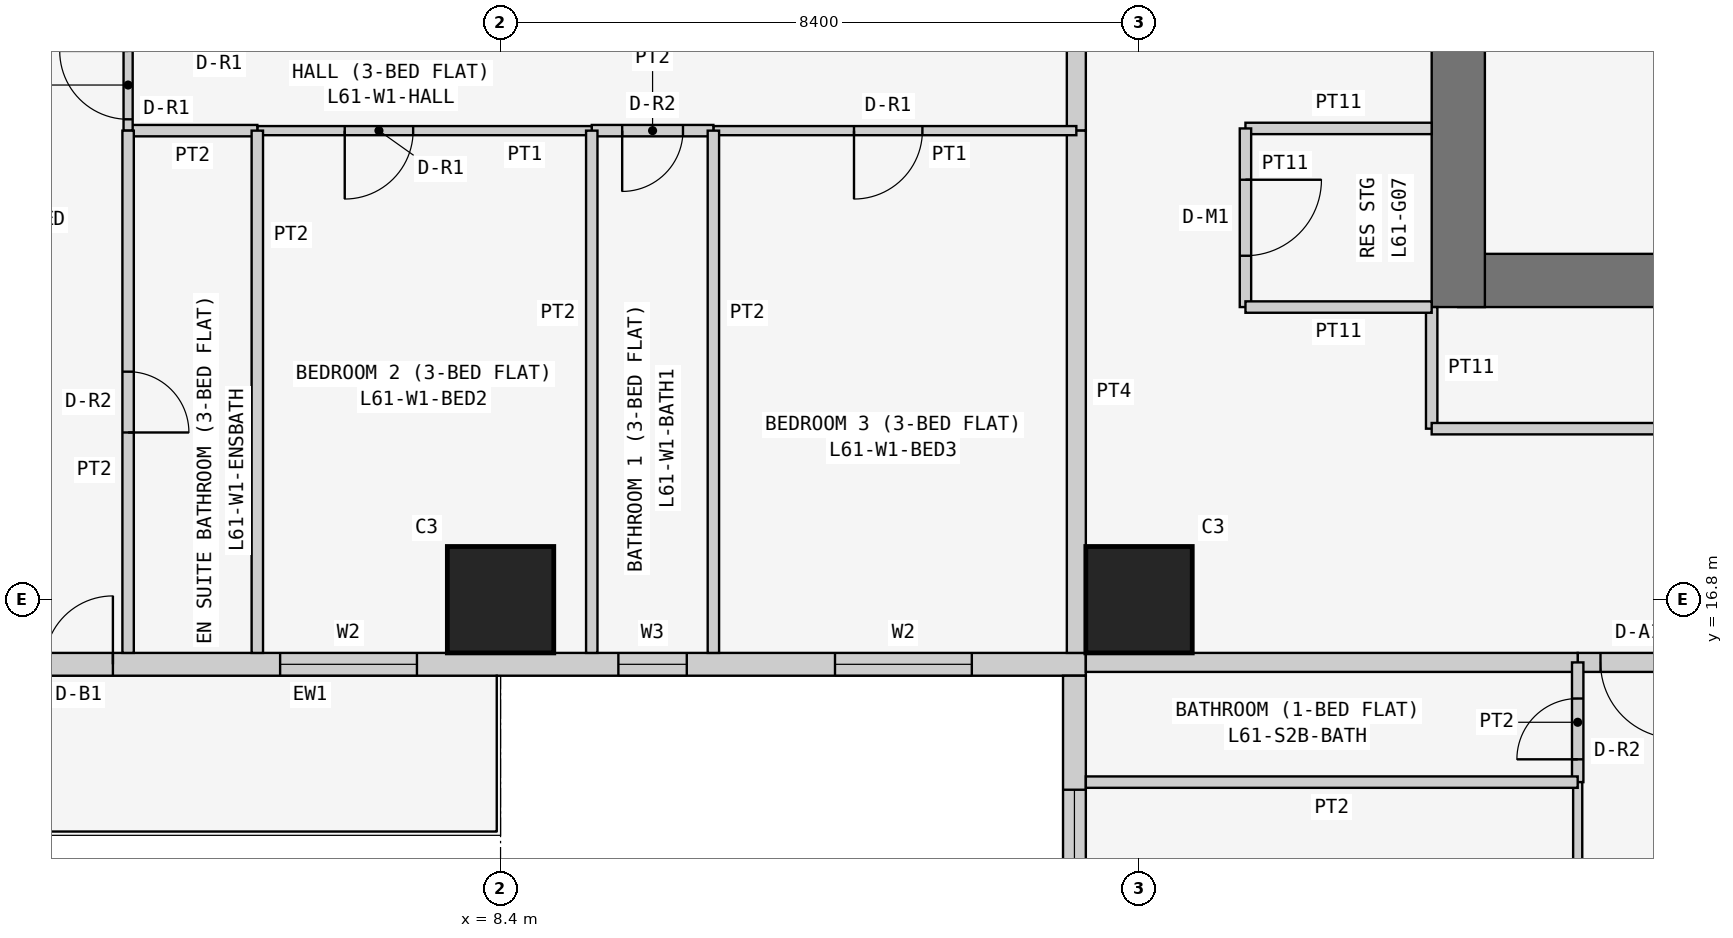
"""IFC4 building model, lengths in metres.
Left out: names, types, materials, properties, quantities, classifications, styles, units other than length and angle.
Written with IfcOpenShell. Run it as: python <this file> out.ifc"""

import sys

from ifc_helpers import new_model, si_unit, direction, frame, frame_2d, origin, origin_2d, place, context, subcontext, project, spatial, rectangle, extrude, element, fill, save


model = new_model("IFC4")
c1 = context("Model", 3, precision=1e-05, world=origin(), true_north=direction((0.0, 1.0)))
c2 = subcontext(c1, "Body", "Model", "MODEL_VIEW")
j1 = project(units=[si_unit("LENGTHUNIT", "METRE"), si_unit("PLANEANGLEUNIT", "RADIAN")], contexts=[c1])
p1 = place(None, origin())
s1 = spatial("IfcSite", under=j1, at=p1, CompositionType="ELEMENT")
p2 = place(p1, origin())
s2 = spatial("IfcBuilding", under=s1, at=p2, CompositionType="ELEMENT")
p3 = place(p2, frame((0.0, 0.0, 233.7)))
s3 = spatial("IfcBuildingStorey", under=s2, at=p3, CompositionType="ELEMENT", Elevation=233.7)
for number, where, z_axis, x_axis in (
    (1, (8.4, 16.8, 0.0), (0.0, 0.0, 1.0), (1.0, 0.0, 0.0)),
    (2, (16.8, 16.8, 0.0), (0.0, 0.0, 1.0), (1.0, 0.0, 0.0)),
):
    element("IfcColumn", number, at=place(p3, frame(where, z_axis=z_axis, x_axis=x_axis)), inside=s3, PredefinedType="COLUMN", context=c2, shape_type="SweptSolid", body=[
        extrude(rectangle(XDim=1.4, YDim=1.4, at=origin_2d()), origin(), (0.0, 0.0, 1.0), 3.6),
    ])
p4 = place(p3, frame((21.0, 21.0, 0.0), z_axis=(0.0, 0.0, 1.0), x_axis=(1.0, 0.0, 0.0)))
e3 = element("IfcWall", 3, at=p4, inside=s3, PredefinedType="SHEAR", context=c2, shape_type="SweptSolid", body=[
    extrude(rectangle(XDim=17.15, YDim=0.7, at=frame_2d((8.575, 0.0))), origin(), (0.0, 0.0, 1.0), 3.6),
])
p5 = place(p3, frame((21.0, 37.8, 0.0), z_axis=(0.0, 0.0, 1.0), x_axis=(0.0, -1.0, 0.0)))
e4 = element("IfcWall", 4, at=p5, inside=s3, PredefinedType="SHEAR", context=c2, shape_type="SweptSolid", body=[
    extrude(rectangle(XDim=17.15, YDim=0.7, at=frame_2d((8.575, 0.0))), origin(), (0.0, 0.0, 1.0), 3.6),
])
p6 = place(p5, frame((5.4, 0.0, 0.0)))
e5 = element("IfcOpeningElement", 5, at=p6, cuts=e4, PredefinedType="OPENING", context=c2, shape_type="SweptSolid", body=[
    extrude(rectangle(XDim=1.2, YDim=2.1, at=frame_2d((0.6, 1.05))), frame((0.0, 0.36, 0.0), z_axis=(0.0, -1.0, 0.0), x_axis=(1.0, 0.0, 0.0)), (0.0, 0.0, 1.0), 0.72),
])
p7 = place(p3, frame((0.4, 15.95, 0.0), z_axis=(0.0, 0.0, 1.0), x_axis=(1.0, 0.0, 0.0)))
e6 = element("IfcWall", 6, at=p7, inside=s3, PredefinedType="SOLIDWALL", context=c2, shape_type="SweptSolid", body=[
    extrude(rectangle(XDim=15.7, YDim=0.3, at=frame_2d((7.85, 0.0))), origin(), (0.0, 0.0, 1.0), 3.45),
])
p8 = place(p7, frame((12.4, 0.0, 0.9)))
e7 = element("IfcOpeningElement", 7, at=p8, cuts=e6, PredefinedType="OPENING", context=c2, shape_type="SweptSolid", body=[
    extrude(rectangle(XDim=1.8, YDim=1.5, at=frame_2d((0.9, 0.75))), frame((0.0, 0.16, 0.0), z_axis=(0.0, -1.0, 0.0), x_axis=(1.0, 0.0, 0.0)), (0.0, 0.0, 1.0), 0.32),
])
p9 = place(p7, frame((9.55, 0.0, 1.5)))
e8 = element("IfcOpeningElement", 8, at=p9, cuts=e6, PredefinedType="OPENING", context=c2, shape_type="SweptSolid", body=[
    extrude(rectangle(XDim=0.9, YDim=0.7, at=frame_2d((0.45, 0.35))), frame((0.0, 0.16, 0.0), z_axis=(0.0, -1.0, 0.0), x_axis=(1.0, 0.0, 0.0)), (0.0, 0.0, 1.0), 0.32),
])
p10 = place(p7, frame((5.1, 0.0, 0.9)))
e9 = element("IfcOpeningElement", 9, at=p10, cuts=e6, PredefinedType="OPENING", context=c2, shape_type="SweptSolid", body=[
    extrude(rectangle(XDim=1.8, YDim=1.5, at=frame_2d((0.9, 0.75))), frame((0.0, 0.16, 0.0), z_axis=(0.0, -1.0, 0.0), x_axis=(1.0, 0.0, 0.0)), (0.0, 0.0, 1.0), 0.32),
])
p11 = place(p7, frame((2.0, 0.0, 0.0)))
e10 = element("IfcOpeningElement", 10, at=p11, cuts=e6, PredefinedType="OPENING", context=c2, shape_type="SweptSolid", body=[
    extrude(rectangle(XDim=0.9, YDim=2.4, at=frame_2d((0.45, 1.2))), frame((0.0, 0.16, 0.0), z_axis=(0.0, -1.0, 0.0), x_axis=(1.0, 0.0, 0.0)), (0.0, 0.0, 1.0), 0.32),
])
p12 = place(p7, frame((0.7, 0.0, 0.9)))
e11 = element("IfcOpeningElement", 11, at=p12, cuts=e6, PredefinedType="OPENING", context=c2, shape_type="SweptSolid", body=[
    extrude(rectangle(XDim=1.2, YDim=1.5, at=frame_2d((0.6, 0.75))), frame((0.0, 0.16, 0.0), z_axis=(0.0, -1.0, 0.0), x_axis=(1.0, 0.0, 0.0)), (0.0, 0.0, 1.0), 0.32),
])
p13 = place(p3, frame((15.95, 15.8, 0.0), z_axis=(0.0, 0.0, 1.0), x_axis=(0.0, -1.0, 0.0)))
e12 = element("IfcWall", 12, at=p13, inside=s3, PredefinedType="SOLIDWALL", context=c2, shape_type="SweptSolid", body=[
    extrude(rectangle(XDim=7.0, YDim=0.3, at=frame_2d((3.5, 0.0))), origin(), (0.0, 0.0, 1.0), 3.45),
])
p14 = place(p13, frame((1.5, 0.0, 0.9)))
e13 = element("IfcOpeningElement", 13, at=p14, cuts=e12, PredefinedType="OPENING", context=c2, shape_type="SweptSolid", body=[
    extrude(rectangle(XDim=2.4, YDim=1.5, at=frame_2d((1.2, 0.75))), frame((0.0, 0.16, 0.0), z_axis=(0.0, -1.0, 0.0), x_axis=(1.0, 0.0, 0.0)), (0.0, 0.0, 1.0), 0.32),
])
p15 = place(p13, frame((5.05, 0.0, 0.9)))
e14 = element("IfcOpeningElement", 14, at=p15, cuts=e12, PredefinedType="OPENING", context=c2, shape_type="SweptSolid", body=[
    extrude(rectangle(XDim=1.2, YDim=1.5, at=frame_2d((0.6, 0.75))), frame((0.0, 0.16, 0.0), z_axis=(0.0, -1.0, 0.0), x_axis=(1.0, 0.0, 0.0)), (0.0, 0.0, 1.0), 0.32),
])
p16 = place(p3, frame((20.65, 20.65, 0.0), z_axis=(0.0, 0.0, 1.0), x_axis=(0.0, -1.0, 0.0)))
e15 = element("IfcWall", 15, at=p16, inside=s3, PredefinedType="PARTITIONING", context=c2, shape_type="SweptSolid", body=[
    extrude(rectangle(XDim=1.6, YDim=0.15, at=frame_2d((0.8, 0.0))), origin(), (0.0, 0.0, 1.0), 3.45),
])
p17 = place(p3, frame((20.65, 19.05, 0.0), z_axis=(0.0, 0.0, 1.0), x_axis=(1.0, 0.0, 0.0)))
e16 = element("IfcWall", 16, at=p17, inside=s3, PredefinedType="PARTITIONING", context=c2, shape_type="SweptSolid", body=[
    extrude(rectangle(XDim=11.95, YDim=0.15, at=frame_2d((5.975, 0.0))), origin(), (0.0, 0.0, 1.0), 3.45),
])
p18 = place(p17, frame((8.25, 0.0, 0.0)))
e17 = element("IfcOpeningElement", 17, at=p18, cuts=e16, PredefinedType="OPENING", context=c2, shape_type="SweptSolid", body=[
    extrude(rectangle(XDim=1.0, YDim=2.1, at=frame_2d((0.5, 1.05))), frame((0.0, 0.085, 0.0), z_axis=(0.0, -1.0, 0.0), x_axis=(1.0, 0.0, 0.0)), (0.0, 0.0, 1.0), 0.17),
])
p19 = place(p3, frame((20.65, 23.0, 0.0), z_axis=(0.0, 0.0, 1.0), x_axis=(-1.0, 0.0, 0.0)))
e18 = element("IfcWall", 18, at=p19, inside=s3, PredefinedType="PARTITIONING", context=c2, shape_type="SweptSolid", body=[
    extrude(rectangle(XDim=2.45, YDim=0.15, at=frame_2d((1.225, 0.0))), origin(), (0.0, 0.0, 1.0), 3.45),
])
p20 = place(p3, frame((18.2, 23.0, 0.0), z_axis=(0.0, 0.0, 1.0), x_axis=(0.0, -1.0, 0.0)))
e19 = element("IfcWall", 19, at=p20, inside=s3, PredefinedType="PARTITIONING", context=c2, shape_type="SweptSolid", body=[
    extrude(rectangle(XDim=2.35, YDim=0.15, at=frame_2d((1.175, 0.0))), origin(), (0.0, 0.0, 1.0), 3.45),
])
p21 = place(p20, frame((0.675, 0.0, 0.0)))
e20 = element("IfcOpeningElement", 20, at=p21, cuts=e19, PredefinedType="OPENING", context=c2, shape_type="SweptSolid", body=[
    extrude(rectangle(XDim=1.0, YDim=2.1, at=frame_2d((0.5, 1.05))), frame((0.0, 0.085, 0.0), z_axis=(0.0, -1.0, 0.0), x_axis=(1.0, 0.0, 0.0)), (0.0, 0.0, 1.0), 0.17),
])
p22 = place(p3, frame((18.2, 20.65, 0.0), z_axis=(0.0, 0.0, 1.0), x_axis=(1.0, 0.0, 0.0)))
e21 = element("IfcWall", 21, at=p22, inside=s3, PredefinedType="PARTITIONING", context=c2, shape_type="SweptSolid", body=[
    extrude(rectangle(XDim=2.45, YDim=0.15, at=frame_2d((1.225, 0.0))), origin(), (0.0, 0.0, 1.0), 3.45),
])
p23 = place(p3, frame((24.171, 15.975, 0.0), z_axis=(0.0, 0.0, 1.0), x_axis=(-1.0, 0.0, 0.0)))
e22 = element("IfcWall", 22, at=p23, inside=s3, PredefinedType="PARTITIONING", context=c2, shape_type="SweptSolid", body=[
    extrude(rectangle(XDim=1.6, YDim=0.25, at=frame_2d((0.8, 0.0))), origin(), (0.0, 0.0, 1.0), 3.45),
])
p24 = place(p23, frame((0.3, 0.0, 0.0)))
e23 = element("IfcOpeningElement", 23, at=p24, cuts=e22, PredefinedType="OPENING", context=c2, shape_type="SweptSolid", body=[
    extrude(rectangle(XDim=1.0, YDim=2.1, at=frame_2d((0.5, 1.05))), frame((0.0, 0.135, 0.0), z_axis=(0.0, -1.0, 0.0), x_axis=(1.0, 0.0, 0.0)), (0.0, 0.0, 1.0), 0.27),
])
p25 = place(p3, frame((22.571, 15.975, 0.0), z_axis=(0.0, 0.0, 1.0), x_axis=(-1.0, 0.0, 0.0)))
e24 = element("IfcWall", 24, at=p25, inside=s3, PredefinedType="PARTITIONING", context=c2, shape_type="SweptSolid", body=[
    extrude(rectangle(XDim=6.471, YDim=0.25, at=frame_2d((3.235, 0.0))), origin(), (0.0, 0.0, 1.0), 3.45),
])
p26 = place(p3, frame((15.975, 22.971, 0.0), z_axis=(0.0, 0.0, 1.0), x_axis=(0.0, 1.0, 0.0)))
e25 = element("IfcWall", 25, at=p26, inside=s3, PredefinedType="PARTITIONING", context=c2, shape_type="SweptSolid", body=[
    extrude(rectangle(XDim=1.2, YDim=0.25, at=frame_2d((0.6, 0.0))), origin(), (0.0, 0.0, 1.0), 3.45),
])
p27 = place(p3, frame((15.975, 16.1, 0.0), z_axis=(0.0, 0.0, 1.0), x_axis=(0.0, 1.0, 0.0)))
e26 = element("IfcWall", 26, at=p27, inside=s3, PredefinedType="PARTITIONING", context=c2, shape_type="SweptSolid", body=[
    extrude(rectangle(XDim=6.871, YDim=0.25, at=frame_2d((3.436, 0.0))), origin(), (0.0, 0.0, 1.0), 3.45),
])
p28 = place(p3, frame((22.571, 14.4, 0.0), z_axis=(0.0, 0.0, 1.0), x_axis=(0.0, 1.0, 0.0)))
e27 = element("IfcWall", 27, at=p28, inside=s3, PredefinedType="PARTITIONING", context=c2, shape_type="SweptSolid", body=[
    extrude(rectangle(XDim=1.575, YDim=0.15, at=frame_2d((0.788, 0.0))), origin(), (0.0, 0.0, 1.0), 3.45),
])
p29 = place(p28, frame((0.3, 0.0, 0.0)))
e28 = element("IfcOpeningElement", 28, at=p29, cuts=e27, PredefinedType="OPENING", context=c2, shape_type="SweptSolid", body=[
    extrude(rectangle(XDim=0.8, YDim=2.1, at=frame_2d((0.4, 1.05))), frame((0.0, 0.085, 0.0), z_axis=(0.0, -1.0, 0.0), x_axis=(1.0, 0.0, 0.0)), (0.0, 0.0, 1.0), 0.17),
])
p30 = place(p3, frame((22.571, 11.0, 0.0), z_axis=(0.0, 0.0, 1.0), x_axis=(0.0, 1.0, 0.0)))
e29 = element("IfcWall", 29, at=p30, inside=s3, PredefinedType="PARTITIONING", context=c2, shape_type="SweptSolid", body=[
    extrude(rectangle(XDim=3.4, YDim=0.12, at=frame_2d((1.7, 0.0))), origin(), (0.0, 0.0, 1.0), 3.45),
])
p31 = place(p30, frame((1.25, 0.0, 0.0)))
e30 = element("IfcOpeningElement", 30, at=p31, cuts=e29, PredefinedType="OPENING", context=c2, shape_type="SweptSolid", body=[
    extrude(rectangle(XDim=0.9, YDim=2.1, at=frame_2d((0.45, 1.05))), frame((0.0, 0.07, 0.0), z_axis=(0.0, -1.0, 0.0), x_axis=(1.0, 0.0, 0.0)), (0.0, 0.0, 1.0), 0.14),
])
p32 = place(p3, frame((22.571, 14.4, 0.0), z_axis=(0.0, 0.0, 1.0), x_axis=(-1.0, 0.0, 0.0)))
e31 = element("IfcWall", 31, at=p32, inside=s3, PredefinedType="PARTITIONING", context=c2, shape_type="SweptSolid", body=[
    extrude(rectangle(XDim=6.471, YDim=0.15, at=frame_2d((3.235, 0.0))), origin(), (0.0, 0.0, 1.0), 3.45),
])
p33 = place(p3, frame((11.2, 22.971, 0.0), z_axis=(0.0, 0.0, 1.0), x_axis=(1.0, 0.0, 0.0)))
e32 = element("IfcWall", 32, at=p33, inside=s3, PredefinedType="PARTITIONING", context=c2, shape_type="SweptSolid", body=[
    extrude(rectangle(XDim=4.775, YDim=0.12, at=frame_2d((2.388, 0.0))), origin(), (0.0, 0.0, 1.0), 3.45),
])
p34 = place(p33, frame((1.85, 0.0, 0.0)))
e33 = element("IfcOpeningElement", 33, at=p34, cuts=e32, PredefinedType="OPENING", context=c2, shape_type="SweptSolid", body=[
    extrude(rectangle(XDim=0.9, YDim=2.1, at=frame_2d((0.45, 1.05))), frame((0.0, 0.07, 0.0), z_axis=(0.0, -1.0, 0.0), x_axis=(1.0, 0.0, 0.0)), (0.0, 0.0, 1.0), 0.14),
])
p35 = place(p3, frame((9.6, 22.971, 0.0), z_axis=(0.0, 0.0, 1.0), x_axis=(1.0, 0.0, 0.0)))
e34 = element("IfcWall", 34, at=p35, inside=s3, PredefinedType="PARTITIONING", context=c2, shape_type="SweptSolid", body=[
    extrude(rectangle(XDim=1.6, YDim=0.15, at=frame_2d((0.8, 0.0))), origin(), (0.0, 0.0, 1.0), 3.45),
])
p36 = place(p35, frame((0.4, 0.0, 0.0)))
e35 = element("IfcOpeningElement", 35, at=p36, cuts=e34, PredefinedType="OPENING", context=c2, shape_type="SweptSolid", body=[
    extrude(rectangle(XDim=0.8, YDim=2.1, at=frame_2d((0.4, 1.05))), frame((0.0, 0.085, 0.0), z_axis=(0.0, -1.0, 0.0), x_axis=(1.0, 0.0, 0.0)), (0.0, 0.0, 1.0), 0.17),
])
p37 = place(p3, frame((5.2, 22.971, 0.0), z_axis=(0.0, 0.0, 1.0), x_axis=(1.0, 0.0, 0.0)))
e36 = element("IfcWall", 36, at=p37, inside=s3, PredefinedType="PARTITIONING", context=c2, shape_type="SweptSolid", body=[
    extrude(rectangle(XDim=4.4, YDim=0.12, at=frame_2d((2.2, 0.0))), origin(), (0.0, 0.0, 1.0), 3.45),
])
p38 = place(p37, frame((1.15, 0.0, 0.0)))
e37 = element("IfcOpeningElement", 37, at=p38, cuts=e36, PredefinedType="OPENING", context=c2, shape_type="SweptSolid", body=[
    extrude(rectangle(XDim=0.9, YDim=2.1, at=frame_2d((0.45, 1.05))), frame((0.0, 0.07, 0.0), z_axis=(0.0, -1.0, 0.0), x_axis=(1.0, 0.0, 0.0)), (0.0, 0.0, 1.0), 0.14),
])
p39 = place(p3, frame((3.5, 22.971, 0.0), z_axis=(0.0, 0.0, 1.0), x_axis=(1.0, 0.0, 0.0)))
e38 = element("IfcWall", 38, at=p39, inside=s3, PredefinedType="PARTITIONING", context=c2, shape_type="SweptSolid", body=[
    extrude(rectangle(XDim=1.7, YDim=0.15, at=frame_2d((0.85, 0.0))), origin(), (0.0, 0.0, 1.0), 3.45),
])
p40 = place(p3, frame((3.5, 24.171, 0.0), z_axis=(0.0, 0.0, 1.0), x_axis=(0.0, -1.0, 0.0)))
e39 = element("IfcWall", 39, at=p40, inside=s3, PredefinedType="PARTITIONING", context=c2, shape_type="SweptSolid", body=[
    extrude(rectangle(XDim=1.2, YDim=0.12, at=frame_2d((0.6, 0.0))), origin(), (0.0, 0.0, 1.0), 3.45),
])
p41 = place(p40, frame((0.151, 0.0, 0.0)))
e40 = element("IfcOpeningElement", 40, at=p41, cuts=e39, PredefinedType="OPENING", context=c2, shape_type="SweptSolid", body=[
    extrude(rectangle(XDim=0.9, YDim=2.1, at=frame_2d((0.45, 1.05))), frame((0.0, 0.07, 0.0), z_axis=(0.0, -1.0, 0.0), x_axis=(1.0, 0.0, 0.0)), (0.0, 0.0, 1.0), 0.14),
])
for number, where, z_axis, x_axis in (
    (41, (11.2, 22.971, 0.0), (0.0, 0.0, 1.0), (0.0, -1.0, 0.0)),
    (42, (9.6, 22.971, 0.0), (0.0, 0.0, 1.0), (0.0, -1.0, 0.0)),
    (43, (5.2, 22.971, 0.0), (0.0, 0.0, 1.0), (0.0, -1.0, 0.0)),
):
    element("IfcWall", number, at=place(p3, frame(where, z_axis=z_axis, x_axis=x_axis)), inside=s3, PredefinedType="PARTITIONING", context=c2, shape_type="SweptSolid", body=[
        extrude(rectangle(XDim=6.871, YDim=0.15, at=frame_2d((3.436, 0.0))), origin(), (0.0, 0.0, 1.0), 3.45),
    ])
p42 = place(p3, frame((3.5, 22.971, 0.0), z_axis=(0.0, 0.0, 1.0), x_axis=(0.0, -1.0, 0.0)))
e44 = element("IfcWall", 44, at=p42, inside=s3, PredefinedType="PARTITIONING", context=c2, shape_type="SweptSolid", body=[
    extrude(rectangle(XDim=6.871, YDim=0.15, at=frame_2d((3.436, 0.0))), origin(), (0.0, 0.0, 1.0), 3.45),
])
p43 = place(p42, frame((3.171, 0.0, 0.0)))
e45 = element("IfcOpeningElement", 45, at=p43, cuts=e44, PredefinedType="OPENING", context=c2, shape_type="SweptSolid", body=[
    extrude(rectangle(XDim=0.8, YDim=2.1, at=frame_2d((0.4, 1.05))), frame((0.0, 0.085, 0.0), z_axis=(0.0, -1.0, 0.0), x_axis=(1.0, 0.0, 0.0)), (0.0, 0.0, 1.0), 0.17),
])
p44 = place(p14, origin())
e46 = element("IfcWindow", 46, at=p44, inside=s3, PartitioningType="SINGLE_PANEL", PredefinedType="WINDOW", context=c2, shape_type="SweptSolid", body=[
    extrude(rectangle(XDim=2.4, YDim=1.5, at=frame_2d((1.2, 0.75))), frame((0.0, 0.03, 0.0), z_axis=(0.0, -1.0, 0.0), x_axis=(1.0, 0.0, 0.0)), (0.0, 0.0, 1.0), 0.06),
])
fill(e13, e46)
p45 = place(p8, origin())
e47 = element("IfcWindow", 47, at=p45, inside=s3, PartitioningType="SINGLE_PANEL", PredefinedType="WINDOW", context=c2, shape_type="SweptSolid", body=[
    extrude(rectangle(XDim=1.8, YDim=1.5, at=frame_2d((0.9, 0.75))), frame((0.0, 0.03, 0.0), z_axis=(0.0, -1.0, 0.0), x_axis=(1.0, 0.0, 0.0)), (0.0, 0.0, 1.0), 0.06),
])
fill(e7, e47)
p46 = place(p9, origin())
e48 = element("IfcWindow", 48, at=p46, inside=s3, PartitioningType="SINGLE_PANEL", PredefinedType="WINDOW", context=c2, shape_type="SweptSolid", body=[
    extrude(rectangle(XDim=0.9, YDim=0.7, at=frame_2d((0.45, 0.35))), frame((0.0, 0.03, 0.0), z_axis=(0.0, -1.0, 0.0), x_axis=(1.0, 0.0, 0.0)), (0.0, 0.0, 1.0), 0.06),
])
fill(e8, e48)
p47 = place(p10, origin())
e49 = element("IfcWindow", 49, at=p47, inside=s3, PartitioningType="SINGLE_PANEL", PredefinedType="WINDOW", context=c2, shape_type="SweptSolid", body=[
    extrude(rectangle(XDim=1.8, YDim=1.5, at=frame_2d((0.9, 0.75))), frame((0.0, 0.03, 0.0), z_axis=(0.0, -1.0, 0.0), x_axis=(1.0, 0.0, 0.0)), (0.0, 0.0, 1.0), 0.06),
])
fill(e9, e49)
p48 = place(p11, origin())
e50 = element("IfcDoor", 50, at=p48, inside=s3, OperationType="SINGLE_SWING_RIGHT", PredefinedType="DOOR", context=c2, shape_type="SweptSolid", body=[
    extrude(rectangle(XDim=0.9, YDim=2.4, at=frame_2d((0.45, 1.2))), frame((0.0, 0.025, 0.0), z_axis=(0.0, -1.0, 0.0), x_axis=(1.0, 0.0, 0.0)), (0.0, 0.0, 1.0), 0.05),
])
fill(e10, e50)
p49 = place(p21, origin())
e51 = element("IfcDoor", 51, at=p49, inside=s3, OperationType="SINGLE_SWING_LEFT", PredefinedType="DOOR", context=c2, shape_type="SweptSolid", body=[
    extrude(rectangle(XDim=1.0, YDim=2.1, at=frame_2d((0.5, 1.05))), frame((0.0, 0.025, 0.0), z_axis=(0.0, -1.0, 0.0), x_axis=(1.0, 0.0, 0.0)), (0.0, 0.0, 1.0), 0.05),
])
fill(e20, e51)
p50 = place(p24, origin())
e52 = element("IfcDoor", 52, at=p50, inside=s3, OperationType="SINGLE_SWING_LEFT", PredefinedType="DOOR", context=c2, shape_type="SweptSolid", body=[
    extrude(rectangle(XDim=1.0, YDim=2.1, at=frame_2d((0.5, 1.05))), frame((0.0, 0.025, 0.0), z_axis=(0.0, -1.0, 0.0), x_axis=(1.0, 0.0, 0.0)), (0.0, 0.0, 1.0), 0.05),
])
fill(e23, e52)
p51 = place(p29, origin())
e53 = element("IfcDoor", 53, at=p51, inside=s3, OperationType="SINGLE_SWING_LEFT", PredefinedType="DOOR", context=c2, shape_type="SweptSolid", body=[
    extrude(rectangle(XDim=0.8, YDim=2.1, at=frame_2d((0.4, 1.05))), frame((0.0, 0.025, 0.0), z_axis=(0.0, -1.0, 0.0), x_axis=(1.0, 0.0, 0.0)), (0.0, 0.0, 1.0), 0.05),
])
fill(e28, e53)
p52 = place(p34, frame((0.9, 0.0, 0.0), z_axis=(0.0, 0.0, 1.0), x_axis=(-1.0, 0.0, 0.0)))
e54 = element("IfcDoor", 54, at=p52, inside=s3, OperationType="SINGLE_SWING_RIGHT", PredefinedType="DOOR", context=c2, shape_type="SweptSolid", body=[
    extrude(rectangle(XDim=0.9, YDim=2.1, at=frame_2d((0.45, 1.05))), frame((0.0, 0.025, 0.0), z_axis=(0.0, -1.0, 0.0), x_axis=(1.0, 0.0, 0.0)), (0.0, 0.0, 1.0), 0.05),
])
fill(e33, e54)
p53 = place(p36, frame((0.8, 0.0, 0.0), z_axis=(0.0, 0.0, 1.0), x_axis=(-1.0, 0.0, 0.0)))
e55 = element("IfcDoor", 55, at=p53, inside=s3, OperationType="SINGLE_SWING_RIGHT", PredefinedType="DOOR", context=c2, shape_type="SweptSolid", body=[
    extrude(rectangle(XDim=0.8, YDim=2.1, at=frame_2d((0.4, 1.05))), frame((0.0, 0.025, 0.0), z_axis=(0.0, -1.0, 0.0), x_axis=(1.0, 0.0, 0.0)), (0.0, 0.0, 1.0), 0.05),
])
fill(e35, e55)
p54 = place(p38, frame((0.9, 0.0, 0.0), z_axis=(0.0, 0.0, 1.0), x_axis=(-1.0, 0.0, 0.0)))
e56 = element("IfcDoor", 56, at=p54, inside=s3, OperationType="SINGLE_SWING_RIGHT", PredefinedType="DOOR", context=c2, shape_type="SweptSolid", body=[
    extrude(rectangle(XDim=0.9, YDim=2.1, at=frame_2d((0.45, 1.05))), frame((0.0, 0.025, 0.0), z_axis=(0.0, -1.0, 0.0), x_axis=(1.0, 0.0, 0.0)), (0.0, 0.0, 1.0), 0.05),
])
fill(e37, e56)
p55 = place(p41, frame((0.9, 0.0, 0.0), z_axis=(0.0, 0.0, 1.0), x_axis=(-1.0, 0.0, 0.0)))
e57 = element("IfcDoor", 57, at=p55, inside=s3, OperationType="SINGLE_SWING_RIGHT", PredefinedType="DOOR", context=c2, shape_type="SweptSolid", body=[
    extrude(rectangle(XDim=0.9, YDim=2.1, at=frame_2d((0.45, 1.05))), frame((0.0, 0.025, 0.0), z_axis=(0.0, -1.0, 0.0), x_axis=(1.0, 0.0, 0.0)), (0.0, 0.0, 1.0), 0.05),
])
fill(e40, e57)
p56 = place(p43, origin())
e58 = element("IfcDoor", 58, at=p56, inside=s3, OperationType="SINGLE_SWING_RIGHT", PredefinedType="DOOR", context=c2, shape_type="SweptSolid", body=[
    extrude(rectangle(XDim=0.8, YDim=2.1, at=frame_2d((0.4, 1.05))), frame((0.0, 0.025, 0.0), z_axis=(0.0, -1.0, 0.0), x_axis=(1.0, 0.0, 0.0)), (0.0, 0.0, 1.0), 0.05),
])
fill(e45, e58)
save(model, sys.argv[1])
